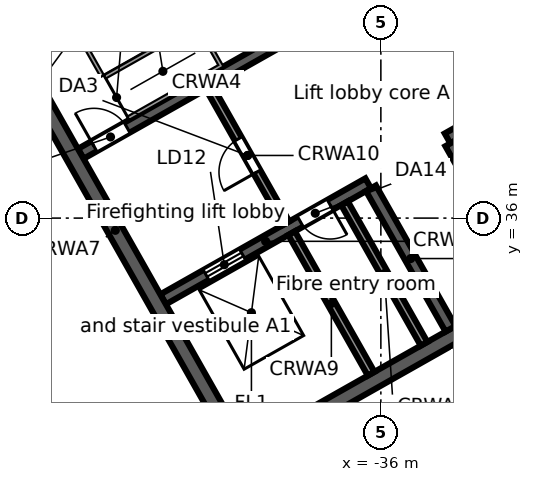
"""IFC4 building model, lengths in metres.
Left out: names, types, materials, properties, quantities, classifications, styles, units other than length and angle.
Written with IfcOpenShell. Run it as: python <this file> out.ifc"""

import sys

from ifc_helpers import new_model, si_unit, direction, frame, frame_2d, origin, place, context, subcontext, project, spatial, rectangle, extrude, element, fill, save


model = new_model("IFC4")
c1 = context("Model", 3, precision=1e-05, world=origin(), true_north=direction((0.0, 1.0)))
c2 = subcontext(c1, "Body", "Model", "MODEL_VIEW")
j1 = project(units=[si_unit("LENGTHUNIT", "METRE"), si_unit("PLANEANGLEUNIT", "RADIAN")], contexts=[c1])
p1 = place(None, origin())
s1 = spatial("IfcSite", under=j1, at=p1, CompositionType="ELEMENT")
p2 = place(p1, origin())
s2 = spatial("IfcBuilding", under=s1, at=p2, CompositionType="ELEMENT")
p3 = place(p2, frame((0.0, 0.0, 304.5)))
s3 = spatial("IfcBuildingStorey", under=s2, at=p3, CompositionType="ELEMENT", Elevation=304.5)
p4 = place(p3, frame((-58.732, 38.771, 0.0), z_axis=(0.0, 0.0, 1.0), x_axis=(0.870355615581, 0.492423702137, 0.0)))
e1 = element("IfcWall", 1, at=p4, inside=s3, PredefinedType="STANDARD", context=c2, shape_type="SweptSolid", body=[
    extrude(rectangle(XDim=64.052, YDim=0.25, at=frame_2d((32.026, 0.0))), origin(), (0.0, 0.0, 1.0), 3.52),
])
p5 = place(p4, frame((61.259, 0.0, 0.8)))
e2 = element("IfcOpeningElement", 2, at=p5, cuts=e1, PredefinedType="OPENING", context=c2, shape_type="SweptSolid", body=[
    extrude(rectangle(XDim=2.4, YDim=2.2, at=frame_2d((1.2, 1.1))), frame((0.0, 0.135, 0.0), z_axis=(0.0, -1.0, 0.0), x_axis=(1.0, 0.0, 0.0)), (0.0, 0.0, 1.0), 0.27),
])
p6 = place(p4, frame((58.216, 0.0, 0.8)))
e3 = element("IfcOpeningElement", 3, at=p6, cuts=e1, PredefinedType="OPENING", context=c2, shape_type="SweptSolid", body=[
    extrude(rectangle(XDim=2.4, YDim=2.2, at=frame_2d((1.2, 1.1))), frame((0.0, 0.135, 0.0), z_axis=(0.0, -1.0, 0.0), x_axis=(1.0, 0.0, 0.0)), (0.0, 0.0, 1.0), 0.27),
])
p7 = place(p4, frame((55.173, 0.0, 0.8)))
e4 = element("IfcOpeningElement", 4, at=p7, cuts=e1, PredefinedType="OPENING", context=c2, shape_type="SweptSolid", body=[
    extrude(rectangle(XDim=2.4, YDim=2.2, at=frame_2d((1.2, 1.1))), frame((0.0, 0.135, 0.0), z_axis=(0.0, -1.0, 0.0), x_axis=(1.0, 0.0, 0.0)), (0.0, 0.0, 1.0), 0.27),
])
p8 = place(p4, frame((52.129, 0.0, 0.8)))
e5 = element("IfcOpeningElement", 5, at=p8, cuts=e1, PredefinedType="OPENING", context=c2, shape_type="SweptSolid", body=[
    extrude(rectangle(XDim=2.4, YDim=2.2, at=frame_2d((1.2, 1.1))), frame((0.0, 0.135, 0.0), z_axis=(0.0, -1.0, 0.0), x_axis=(1.0, 0.0, 0.0)), (0.0, 0.0, 1.0), 0.27),
])
p9 = place(p4, frame((49.086, 0.0, 0.8)))
e6 = element("IfcOpeningElement", 6, at=p9, cuts=e1, PredefinedType="OPENING", context=c2, shape_type="SweptSolid", body=[
    extrude(rectangle(XDim=2.4, YDim=2.2, at=frame_2d((1.2, 1.1))), frame((0.0, 0.135, 0.0), z_axis=(0.0, -1.0, 0.0), x_axis=(1.0, 0.0, 0.0)), (0.0, 0.0, 1.0), 0.27),
])
p10 = place(p4, frame((46.043, 0.0, 0.8)))
e7 = element("IfcOpeningElement", 7, at=p10, cuts=e1, PredefinedType="OPENING", context=c2, shape_type="SweptSolid", body=[
    extrude(rectangle(XDim=2.4, YDim=2.2, at=frame_2d((1.2, 1.1))), frame((0.0, 0.135, 0.0), z_axis=(0.0, -1.0, 0.0), x_axis=(1.0, 0.0, 0.0)), (0.0, 0.0, 1.0), 0.27),
])
p11 = place(p4, frame((43.0, 0.0, 0.8)))
e8 = element("IfcOpeningElement", 8, at=p11, cuts=e1, PredefinedType="OPENING", context=c2, shape_type="SweptSolid", body=[
    extrude(rectangle(XDim=2.4, YDim=2.2, at=frame_2d((1.2, 1.1))), frame((0.0, 0.135, 0.0), z_axis=(0.0, -1.0, 0.0), x_axis=(1.0, 0.0, 0.0)), (0.0, 0.0, 1.0), 0.27),
])
p12 = place(p4, frame((39.956, 0.0, 0.8)))
e9 = element("IfcOpeningElement", 9, at=p12, cuts=e1, PredefinedType="OPENING", context=c2, shape_type="SweptSolid", body=[
    extrude(rectangle(XDim=2.4, YDim=2.2, at=frame_2d((1.2, 1.1))), frame((0.0, 0.135, 0.0), z_axis=(0.0, -1.0, 0.0), x_axis=(1.0, 0.0, 0.0)), (0.0, 0.0, 1.0), 0.27),
])
p13 = place(p4, frame((36.913, 0.0, 0.8)))
e10 = element("IfcOpeningElement", 10, at=p13, cuts=e1, PredefinedType="OPENING", context=c2, shape_type="SweptSolid", body=[
    extrude(rectangle(XDim=2.4, YDim=2.2, at=frame_2d((1.2, 1.1))), frame((0.0, 0.135, 0.0), z_axis=(0.0, -1.0, 0.0), x_axis=(1.0, 0.0, 0.0)), (0.0, 0.0, 1.0), 0.27),
])
p14 = place(p4, frame((33.87, 0.0, 0.8)))
e11 = element("IfcOpeningElement", 11, at=p14, cuts=e1, PredefinedType="OPENING", context=c2, shape_type="SweptSolid", body=[
    extrude(rectangle(XDim=2.4, YDim=2.2, at=frame_2d((1.2, 1.1))), frame((0.0, 0.135, 0.0), z_axis=(0.0, -1.0, 0.0), x_axis=(1.0, 0.0, 0.0)), (0.0, 0.0, 1.0), 0.27),
])
p15 = place(p4, frame((30.826, 0.0, 0.8)))
e12 = element("IfcOpeningElement", 12, at=p15, cuts=e1, PredefinedType="OPENING", context=c2, shape_type="SweptSolid", body=[
    extrude(rectangle(XDim=2.4, YDim=2.2, at=frame_2d((1.2, 1.1))), frame((0.0, 0.135, 0.0), z_axis=(0.0, -1.0, 0.0), x_axis=(1.0, 0.0, 0.0)), (0.0, 0.0, 1.0), 0.27),
])
p16 = place(p4, frame((27.783, 0.0, 0.8)))
e13 = element("IfcOpeningElement", 13, at=p16, cuts=e1, PredefinedType="OPENING", context=c2, shape_type="SweptSolid", body=[
    extrude(rectangle(XDim=2.4, YDim=2.2, at=frame_2d((1.2, 1.1))), frame((0.0, 0.135, 0.0), z_axis=(0.0, -1.0, 0.0), x_axis=(1.0, 0.0, 0.0)), (0.0, 0.0, 1.0), 0.27),
])
p17 = place(p4, frame((24.74, 0.0, 0.8)))
e14 = element("IfcOpeningElement", 14, at=p17, cuts=e1, PredefinedType="OPENING", context=c2, shape_type="SweptSolid", body=[
    extrude(rectangle(XDim=2.4, YDim=2.2, at=frame_2d((1.2, 1.1))), frame((0.0, 0.135, 0.0), z_axis=(0.0, -1.0, 0.0), x_axis=(1.0, 0.0, 0.0)), (0.0, 0.0, 1.0), 0.27),
])
p18 = place(p4, frame((21.696, 0.0, 0.8)))
e15 = element("IfcOpeningElement", 15, at=p18, cuts=e1, PredefinedType="OPENING", context=c2, shape_type="SweptSolid", body=[
    extrude(rectangle(XDim=2.4, YDim=2.2, at=frame_2d((1.2, 1.1))), frame((0.0, 0.135, 0.0), z_axis=(0.0, -1.0, 0.0), x_axis=(1.0, 0.0, 0.0)), (0.0, 0.0, 1.0), 0.27),
])
p19 = place(p4, frame((18.653, 0.0, 0.8)))
e16 = element("IfcOpeningElement", 16, at=p19, cuts=e1, PredefinedType="OPENING", context=c2, shape_type="SweptSolid", body=[
    extrude(rectangle(XDim=2.4, YDim=2.2, at=frame_2d((1.2, 1.1))), frame((0.0, 0.135, 0.0), z_axis=(0.0, -1.0, 0.0), x_axis=(1.0, 0.0, 0.0)), (0.0, 0.0, 1.0), 0.27),
])
p20 = place(p4, frame((15.61, 0.0, 0.8)))
e17 = element("IfcOpeningElement", 17, at=p20, cuts=e1, PredefinedType="OPENING", context=c2, shape_type="SweptSolid", body=[
    extrude(rectangle(XDim=2.4, YDim=2.2, at=frame_2d((1.2, 1.1))), frame((0.0, 0.135, 0.0), z_axis=(0.0, -1.0, 0.0), x_axis=(1.0, 0.0, 0.0)), (0.0, 0.0, 1.0), 0.27),
])
p21 = place(p4, frame((12.567, 0.0, 0.8)))
e18 = element("IfcOpeningElement", 18, at=p21, cuts=e1, PredefinedType="OPENING", context=c2, shape_type="SweptSolid", body=[
    extrude(rectangle(XDim=2.4, YDim=2.2, at=frame_2d((1.2, 1.1))), frame((0.0, 0.135, 0.0), z_axis=(0.0, -1.0, 0.0), x_axis=(1.0, 0.0, 0.0)), (0.0, 0.0, 1.0), 0.27),
])
p22 = place(p4, frame((9.523, 0.0, 0.8)))
e19 = element("IfcOpeningElement", 19, at=p22, cuts=e1, PredefinedType="OPENING", context=c2, shape_type="SweptSolid", body=[
    extrude(rectangle(XDim=2.4, YDim=2.2, at=frame_2d((1.2, 1.1))), frame((0.0, 0.135, 0.0), z_axis=(0.0, -1.0, 0.0), x_axis=(1.0, 0.0, 0.0)), (0.0, 0.0, 1.0), 0.27),
])
p23 = place(p4, frame((6.48, 0.0, 0.8)))
e20 = element("IfcOpeningElement", 20, at=p23, cuts=e1, PredefinedType="OPENING", context=c2, shape_type="SweptSolid", body=[
    extrude(rectangle(XDim=2.4, YDim=2.2, at=frame_2d((1.2, 1.1))), frame((0.0, 0.135, 0.0), z_axis=(0.0, -1.0, 0.0), x_axis=(1.0, 0.0, 0.0)), (0.0, 0.0, 1.0), 0.27),
])
p24 = place(p4, frame((3.437, 0.0, 0.8)))
e21 = element("IfcOpeningElement", 21, at=p24, cuts=e1, PredefinedType="OPENING", context=c2, shape_type="SweptSolid", body=[
    extrude(rectangle(XDim=2.4, YDim=2.2, at=frame_2d((1.2, 1.1))), frame((0.0, 0.135, 0.0), z_axis=(0.0, -1.0, 0.0), x_axis=(1.0, 0.0, 0.0)), (0.0, 0.0, 1.0), 0.27),
])
p25 = place(p4, frame((0.393, 0.0, 0.8)))
e22 = element("IfcOpeningElement", 22, at=p25, cuts=e1, PredefinedType="OPENING", context=c2, shape_type="SweptSolid", body=[
    extrude(rectangle(XDim=2.4, YDim=2.2, at=frame_2d((1.2, 1.1))), frame((0.0, 0.135, 0.0), z_axis=(0.0, -1.0, 0.0), x_axis=(1.0, 0.0, 0.0)), (0.0, 0.0, 1.0), 0.27),
])
p26 = place(p3, frame((-44.115, 26.507, 0.0), z_axis=(0.0, 0.0, 1.0), x_axis=(-0.857166583633, 0.515039268311, 0.0)))
e23 = element("IfcWall", 23, at=p26, inside=s3, PredefinedType="STANDARD", context=c2, shape_type="SweptSolid", body=[
    extrude(rectangle(XDim=17.106, YDim=0.25, at=frame_2d((8.553, 0.0))), origin(), (0.0, 0.0, 1.0), 3.52),
])
p27 = place(p26, frame((14.417, 0.0, 0.8)))
e24 = element("IfcOpeningElement", 24, at=p27, cuts=e23, PredefinedType="OPENING", context=c2, shape_type="SweptSolid", body=[
    extrude(rectangle(XDim=2.4, YDim=2.2, at=frame_2d((1.2, 1.1))), frame((0.0, 0.135, 0.0), z_axis=(0.0, -1.0, 0.0), x_axis=(1.0, 0.0, 0.0)), (0.0, 0.0, 1.0), 0.27),
])
p28 = place(p26, frame((11.584, 0.0, 0.8)))
e25 = element("IfcOpeningElement", 25, at=p28, cuts=e23, PredefinedType="OPENING", context=c2, shape_type="SweptSolid", body=[
    extrude(rectangle(XDim=2.4, YDim=2.2, at=frame_2d((1.2, 1.1))), frame((0.0, 0.135, 0.0), z_axis=(0.0, -1.0, 0.0), x_axis=(1.0, 0.0, 0.0)), (0.0, 0.0, 1.0), 0.27),
])
p29 = place(p26, frame((8.75, 0.0, 0.8)))
e26 = element("IfcOpeningElement", 26, at=p29, cuts=e23, PredefinedType="OPENING", context=c2, shape_type="SweptSolid", body=[
    extrude(rectangle(XDim=2.4, YDim=2.2, at=frame_2d((1.2, 1.1))), frame((0.0, 0.135, 0.0), z_axis=(0.0, -1.0, 0.0), x_axis=(1.0, 0.0, 0.0)), (0.0, 0.0, 1.0), 0.27),
])
p30 = place(p26, frame((5.917, 0.0, 0.8)))
e27 = element("IfcOpeningElement", 27, at=p30, cuts=e23, PredefinedType="OPENING", context=c2, shape_type="SweptSolid", body=[
    extrude(rectangle(XDim=2.4, YDim=2.2, at=frame_2d((1.2, 1.1))), frame((0.0, 0.135, 0.0), z_axis=(0.0, -1.0, 0.0), x_axis=(1.0, 0.0, 0.0)), (0.0, 0.0, 1.0), 0.27),
])
p31 = place(p26, frame((3.084, 0.0, 0.8)))
e28 = element("IfcOpeningElement", 28, at=p31, cuts=e23, PredefinedType="OPENING", context=c2, shape_type="SweptSolid", body=[
    extrude(rectangle(XDim=2.4, YDim=2.2, at=frame_2d((1.2, 1.1))), frame((0.0, 0.135, 0.0), z_axis=(0.0, -1.0, 0.0), x_axis=(1.0, 0.0, 0.0)), (0.0, 0.0, 1.0), 0.27),
])
p32 = place(p26, frame((0.25, 0.0, 0.8)))
e29 = element("IfcOpeningElement", 29, at=p32, cuts=e23, PredefinedType="OPENING", context=c2, shape_type="SweptSolid", body=[
    extrude(rectangle(XDim=2.4, YDim=2.2, at=frame_2d((1.2, 1.1))), frame((0.0, 0.135, 0.0), z_axis=(0.0, -1.0, 0.0), x_axis=(1.0, 0.0, 0.0)), (0.0, 0.0, 1.0), 0.27),
])
p33 = place(p3, frame((-3.017, 46.293, 0.0), z_axis=(0.0, 0.0, 1.0), x_axis=(-0.870355474887, -0.492423950812, 0.0)))
e30 = element("IfcWall", 30, at=p33, inside=s3, PredefinedType="STANDARD", context=c2, shape_type="SweptSolid", body=[
    extrude(rectangle(XDim=40.34, YDim=0.25, at=frame_2d((20.17, 0.0))), origin(), (0.0, 0.0, 1.0), 3.52),
])
p34 = place(p33, frame((37.428, 0.0, 0.8)))
e31 = element("IfcOpeningElement", 31, at=p34, cuts=e30, PredefinedType="OPENING", context=c2, shape_type="SweptSolid", body=[
    extrude(rectangle(XDim=2.4, YDim=2.2, at=frame_2d((1.2, 1.1))), frame((0.0, 0.135, 0.0), z_axis=(0.0, -1.0, 0.0), x_axis=(1.0, 0.0, 0.0)), (0.0, 0.0, 1.0), 0.27),
])
p35 = place(p33, frame((34.372, 0.0, 0.0)))
e32 = element("IfcOpeningElement", 32, at=p35, cuts=e30, PredefinedType="OPENING", context=c2, shape_type="SweptSolid", body=[
    extrude(rectangle(XDim=1.8, YDim=2.4, at=frame_2d((0.9, 1.2))), frame((0.0, 0.135, 0.0), z_axis=(0.0, -1.0, 0.0), x_axis=(1.0, 0.0, 0.0)), (0.0, 0.0, 1.0), 0.27),
])
p36 = place(p33, frame((30.716, 0.0, 0.8)))
e33 = element("IfcOpeningElement", 33, at=p36, cuts=e30, PredefinedType="OPENING", context=c2, shape_type="SweptSolid", body=[
    extrude(rectangle(XDim=2.4, YDim=2.2, at=frame_2d((1.2, 1.1))), frame((0.0, 0.135, 0.0), z_axis=(0.0, -1.0, 0.0), x_axis=(1.0, 0.0, 0.0)), (0.0, 0.0, 1.0), 0.27),
])
p37 = place(p33, frame((27.36, 0.0, 0.8)))
e34 = element("IfcOpeningElement", 34, at=p37, cuts=e30, PredefinedType="OPENING", context=c2, shape_type="SweptSolid", body=[
    extrude(rectangle(XDim=2.4, YDim=2.2, at=frame_2d((1.2, 1.1))), frame((0.0, 0.135, 0.0), z_axis=(0.0, -1.0, 0.0), x_axis=(1.0, 0.0, 0.0)), (0.0, 0.0, 1.0), 0.27),
])
p38 = place(p33, frame((24.304, 0.0, 0.0)))
e35 = element("IfcOpeningElement", 35, at=p38, cuts=e30, PredefinedType="OPENING", context=c2, shape_type="SweptSolid", body=[
    extrude(rectangle(XDim=1.8, YDim=2.4, at=frame_2d((0.9, 1.2))), frame((0.0, 0.135, 0.0), z_axis=(0.0, -1.0, 0.0), x_axis=(1.0, 0.0, 0.0)), (0.0, 0.0, 1.0), 0.27),
])
p39 = place(p33, frame((20.648, 0.0, 0.8)))
e36 = element("IfcOpeningElement", 36, at=p39, cuts=e30, PredefinedType="OPENING", context=c2, shape_type="SweptSolid", body=[
    extrude(rectangle(XDim=2.4, YDim=2.2, at=frame_2d((1.2, 1.1))), frame((0.0, 0.135, 0.0), z_axis=(0.0, -1.0, 0.0), x_axis=(1.0, 0.0, 0.0)), (0.0, 0.0, 1.0), 0.27),
])
p40 = place(p33, frame((17.292, 0.0, 0.8)))
e37 = element("IfcOpeningElement", 37, at=p40, cuts=e30, PredefinedType="OPENING", context=c2, shape_type="SweptSolid", body=[
    extrude(rectangle(XDim=2.4, YDim=2.2, at=frame_2d((1.2, 1.1))), frame((0.0, 0.135, 0.0), z_axis=(0.0, -1.0, 0.0), x_axis=(1.0, 0.0, 0.0)), (0.0, 0.0, 1.0), 0.27),
])
p41 = place(p33, frame((14.236, 0.0, 0.0)))
e38 = element("IfcOpeningElement", 38, at=p41, cuts=e30, PredefinedType="OPENING", context=c2, shape_type="SweptSolid", body=[
    extrude(rectangle(XDim=1.8, YDim=2.4, at=frame_2d((0.9, 1.2))), frame((0.0, 0.135, 0.0), z_axis=(0.0, -1.0, 0.0), x_axis=(1.0, 0.0, 0.0)), (0.0, 0.0, 1.0), 0.27),
])
p42 = place(p33, frame((10.58, 0.0, 0.8)))
e39 = element("IfcOpeningElement", 39, at=p42, cuts=e30, PredefinedType="OPENING", context=c2, shape_type="SweptSolid", body=[
    extrude(rectangle(XDim=2.4, YDim=2.2, at=frame_2d((1.2, 1.1))), frame((0.0, 0.135, 0.0), z_axis=(0.0, -1.0, 0.0), x_axis=(1.0, 0.0, 0.0)), (0.0, 0.0, 1.0), 0.27),
])
p43 = place(p33, frame((7.224, 0.0, 0.8)))
e40 = element("IfcOpeningElement", 40, at=p43, cuts=e30, PredefinedType="OPENING", context=c2, shape_type="SweptSolid", body=[
    extrude(rectangle(XDim=2.4, YDim=2.2, at=frame_2d((1.2, 1.1))), frame((0.0, 0.135, 0.0), z_axis=(0.0, -1.0, 0.0), x_axis=(1.0, 0.0, 0.0)), (0.0, 0.0, 1.0), 0.27),
])
p44 = place(p33, frame((4.168, 0.0, 0.0)))
e41 = element("IfcOpeningElement", 41, at=p44, cuts=e30, PredefinedType="OPENING", context=c2, shape_type="SweptSolid", body=[
    extrude(rectangle(XDim=1.8, YDim=2.4, at=frame_2d((0.9, 1.2))), frame((0.0, 0.135, 0.0), z_axis=(0.0, -1.0, 0.0), x_axis=(1.0, 0.0, 0.0)), (0.0, 0.0, 1.0), 0.27),
])
p45 = place(p33, frame((0.512, 0.0, 0.8)))
e42 = element("IfcOpeningElement", 42, at=p45, cuts=e30, PredefinedType="OPENING", context=c2, shape_type="SweptSolid", body=[
    extrude(rectangle(XDim=2.4, YDim=2.2, at=frame_2d((1.2, 1.1))), frame((0.0, 0.135, 0.0), z_axis=(0.0, -1.0, 0.0), x_axis=(1.0, 0.0, 0.0)), (0.0, 0.0, 1.0), 0.27),
])
p46 = place(p3, frame((-39.813, 29.662, 0.0), z_axis=(0.0, 0.0, 1.0), x_axis=(0.870350116061, 0.492433422375, 0.0)))
e43 = element("IfcWall", 43, at=p46, inside=s3, PredefinedType="SOLIDWALL", context=c2, shape_type="SweptSolid", body=[
    extrude(rectangle(XDim=17.0, YDim=0.4, at=frame_2d((8.5, 0.0))), origin(), (0.0, 0.0, 1.0), 3.52),
])
p47 = place(p46, frame((7.2, 0.0, 0.0)))
e44 = element("IfcOpeningElement", 44, at=p47, cuts=e43, PredefinedType="OPENING", context=c2, shape_type="SweptSolid", body=[
    extrude(rectangle(XDim=1.2, YDim=2.1, at=frame_2d((0.6, 1.05))), frame((0.0, 0.21, 0.0), z_axis=(0.0, -1.0, 0.0), x_axis=(1.0, 0.0, 0.0)), (0.0, 0.0, 1.0), 0.42),
])
p48 = place(p3, frame((-41.73, 33.863, 0.0), z_axis=(0.0, 0.0, 1.0), x_axis=(0.870350800578, 0.492432212525, 0.0)))
e45 = element("IfcWall", 45, at=p48, inside=s3, PredefinedType="SOLIDWALL", context=c2, shape_type="SweptSolid", body=[
    extrude(rectangle(XDim=6.2, YDim=0.3, at=frame_2d((3.1, 0.0))), origin(), (0.0, 0.0, 1.0), 3.52),
])
p49 = place(p48, frame((1.3, 0.0, 0.0)))
e46 = element("IfcOpeningElement", 46, at=p49, cuts=e45, PredefinedType="OPENING", context=c2, shape_type="SweptSolid", body=[
    extrude(rectangle(XDim=1.1, YDim=2.1, at=frame_2d((0.55, 1.05))), frame((0.0, 0.16, 0.0), z_axis=(0.0, -1.0, 0.0), x_axis=(1.0, 0.0, 0.0)), (0.0, 0.0, 1.0), 0.32),
])
p50 = place(p48, frame((4.15, 0.0, 0.0)))
e47 = element("IfcOpeningElement", 47, at=p50, cuts=e45, PredefinedType="OPENING", context=c2, shape_type="SweptSolid", body=[
    extrude(rectangle(XDim=0.9, YDim=2.1, at=frame_2d((0.45, 1.05))), frame((0.0, 0.16, 0.0), z_axis=(0.0, -1.0, 0.0), x_axis=(1.0, 0.0, 0.0)), (0.0, 0.0, 1.0), 0.32),
])
p51 = place(p3, frame((-34.245, 38.097, 0.0), z_axis=(0.0, 0.0, 1.0), x_axis=(0.870356351998, 0.492422400523, 0.0)))
e48 = element("IfcWall", 48, at=p51, inside=s3, PredefinedType="SOLIDWALL", context=c2, shape_type="SweptSolid", body=[
    extrude(rectangle(XDim=7.6, YDim=0.3, at=frame_2d((3.8, 0.0))), origin(), (0.0, 0.0, 1.0), 3.52),
])
p52 = place(p51, frame((6.2, 0.0, 0.0)))
e49 = element("IfcOpeningElement", 49, at=p52, cuts=e48, PredefinedType="OPENING", context=c2, shape_type="SweptSolid", body=[
    extrude(rectangle(XDim=1.0, YDim=2.1, at=frame_2d((0.5, 1.05))), frame((0.0, 0.16, 0.0), z_axis=(0.0, -1.0, 0.0), x_axis=(1.0, 0.0, 0.0)), (0.0, 0.0, 1.0), 0.32),
])
p53 = place(p3, frame((-43.897, 37.692, 0.0), z_axis=(0.0, 0.0, 1.0), x_axis=(0.870356351998, 0.492422400523, 0.0)))
e50 = element("IfcWall", 50, at=p53, inside=s3, PredefinedType="SOLIDWALL", context=c2, shape_type="SweptSolid", body=[
    extrude(rectangle(XDim=7.6, YDim=0.3, at=frame_2d((3.8, 0.0))), origin(), (0.0, 0.0, 1.0), 3.52),
])
p54 = place(p53, frame((0.4, 0.0, 0.0)))
e51 = element("IfcOpeningElement", 51, at=p54, cuts=e50, PredefinedType="OPENING", context=c2, shape_type="SweptSolid", body=[
    extrude(rectangle(XDim=1.0, YDim=2.1, at=frame_2d((0.5, 1.05))), frame((0.0, 0.16, 0.0), z_axis=(0.0, -1.0, 0.0), x_axis=(1.0, 0.0, 0.0)), (0.0, 0.0, 1.0), 0.32),
])
p55 = place(p3, frame((-46.238, 41.423, 0.0), z_axis=(0.0, 0.0, 1.0), x_axis=(0.492421663121, -0.870356769198, 0.0)))
e52 = element("IfcWall", 52, at=p55, inside=s3, PredefinedType="SOLIDWALL", context=c2, shape_type="SweptSolid", body=[
    extrude(rectangle(XDim=13.2, YDim=0.4, at=frame_2d((6.6, 0.0))), origin(), (0.0, 0.0, 1.0), 3.52),
])
p56 = place(p3, frame((-38.349, 35.603, 0.0), z_axis=(0.0, 0.0, 1.0), x_axis=(0.492397924348, -0.870370199454, 0.0)))
e53 = element("IfcWall", 53, at=p56, inside=s3, PredefinedType="SOLIDWALL", context=c2, shape_type="SweptSolid", body=[
    extrude(rectangle(XDim=4.25, YDim=0.2, at=frame_2d((2.125, 0.0))), origin(), (0.0, 0.0, 1.0), 3.52),
])
p57 = place(p3, frame((-40.516, 39.433, 0.0), z_axis=(0.0, 0.0, 1.0), x_axis=(0.492453559952, -0.87033872216, 0.0)))
e54 = element("IfcWall", 54, at=p57, inside=s3, PredefinedType="PARTITIONING", context=c2, shape_type="SweptSolid", body=[
    extrude(rectangle(XDim=4.1, YDim=0.2, at=frame_2d((2.05, 0.0))), origin(), (0.0, 0.0, 1.0), 3.52),
])
p58 = place(p57, frame((1.55, 0.0, 0.0)))
e55 = element("IfcOpeningElement", 55, at=p58, cuts=e54, PredefinedType="OPENING", context=c2, shape_type="SweptSolid", body=[
    extrude(rectangle(XDim=1.0, YDim=2.1, at=frame_2d((0.5, 1.05))), frame((0.0, 0.11, 0.0), z_axis=(0.0, -1.0, 0.0), x_axis=(1.0, 0.0, 0.0)), (0.0, 0.0, 1.0), 0.22),
])
p59 = place(p3, frame((-36.956, 36.391, 0.0), z_axis=(0.0, 0.0, 1.0), x_axis=(0.492397924348, -0.870370199454, 0.0)))
e56 = element("IfcWall", 56, at=p59, inside=s3, PredefinedType="SOLIDWALL", context=c2, shape_type="SweptSolid", body=[
    extrude(rectangle(XDim=4.25, YDim=0.2, at=frame_2d((2.125, 0.0))), origin(), (0.0, 0.0, 1.0), 3.52),
])
for number, where, z_axis, x_axis in (
    (57, (-36.26, 36.785, 0.0), (0.0, 0.0, 1.0), (0.492, -0.87, 0.0)),
    (58, (-34.171, 37.967, 0.0), (0.0, 0.0, 1.0), (0.492, -0.87, 0.0)),
):
    element("IfcWall", number, at=place(p3, frame(where, z_axis=z_axis, x_axis=x_axis)), inside=s3, PredefinedType="SOLIDWALL", context=c2, shape_type="SweptSolid", body=[
        extrude(rectangle(XDim=4.25, YDim=0.3, at=frame_2d((2.125, 0.0))), origin(), (0.0, 0.0, 1.0), 3.52),
    ])
p60 = place(p49, origin())
e59 = element("IfcDoor", 59, at=p60, inside=s3, OperationType="DOUBLE_DOOR_SLIDING", PredefinedType="DOOR", context=c2, shape_type="SweptSolid", body=[
    extrude(rectangle(XDim=1.1, YDim=2.1, at=frame_2d((0.55, 1.05))), frame((0.0, 0.025, 0.0), z_axis=(0.0, -1.0, 0.0), x_axis=(1.0, 0.0, 0.0)), (0.0, 0.0, 1.0), 0.05),
])
fill(e46, e59)
p61 = place(p54, origin())
e60 = element("IfcDoor", 60, at=p61, inside=s3, OperationType="SINGLE_SWING_LEFT", PredefinedType="DOOR", context=c2, shape_type="SweptSolid", body=[
    extrude(rectangle(XDim=1.0, YDim=2.1, at=frame_2d((0.5, 1.05))), frame((0.0, 0.025, 0.0), z_axis=(0.0, -1.0, 0.0), x_axis=(1.0, 0.0, 0.0)), (0.0, 0.0, 1.0), 0.05),
])
fill(e51, e60)
p62 = place(p58, frame((1.0, 0.0, 0.0), z_axis=(0.0, 0.0, 1.0), x_axis=(-1.0, 0.0, 0.0)))
e61 = element("IfcDoor", 61, at=p62, inside=s3, OperationType="SINGLE_SWING_LEFT", PredefinedType="DOOR", context=c2, shape_type="SweptSolid", body=[
    extrude(rectangle(XDim=1.0, YDim=2.1, at=frame_2d((0.5, 1.05))), frame((0.0, 0.025, 0.0), z_axis=(0.0, -1.0, 0.0), x_axis=(1.0, 0.0, 0.0)), (0.0, 0.0, 1.0), 0.05),
])
fill(e55, e61)
p63 = place(p50, frame((0.9, 0.0, 0.0), z_axis=(0.0, 0.0, 1.0), x_axis=(-1.0, 0.0, 0.0)))
e62 = element("IfcDoor", 62, at=p63, inside=s3, OperationType="SINGLE_SWING_LEFT", PredefinedType="DOOR", context=c2, shape_type="SweptSolid", body=[
    extrude(rectangle(XDim=0.9, YDim=2.1, at=frame_2d((0.45, 1.05))), frame((0.0, 0.025, 0.0), z_axis=(0.0, -1.0, 0.0), x_axis=(1.0, 0.0, 0.0)), (0.0, 0.0, 1.0), 0.05),
])
fill(e47, e62)
save(model, sys.argv[1])
